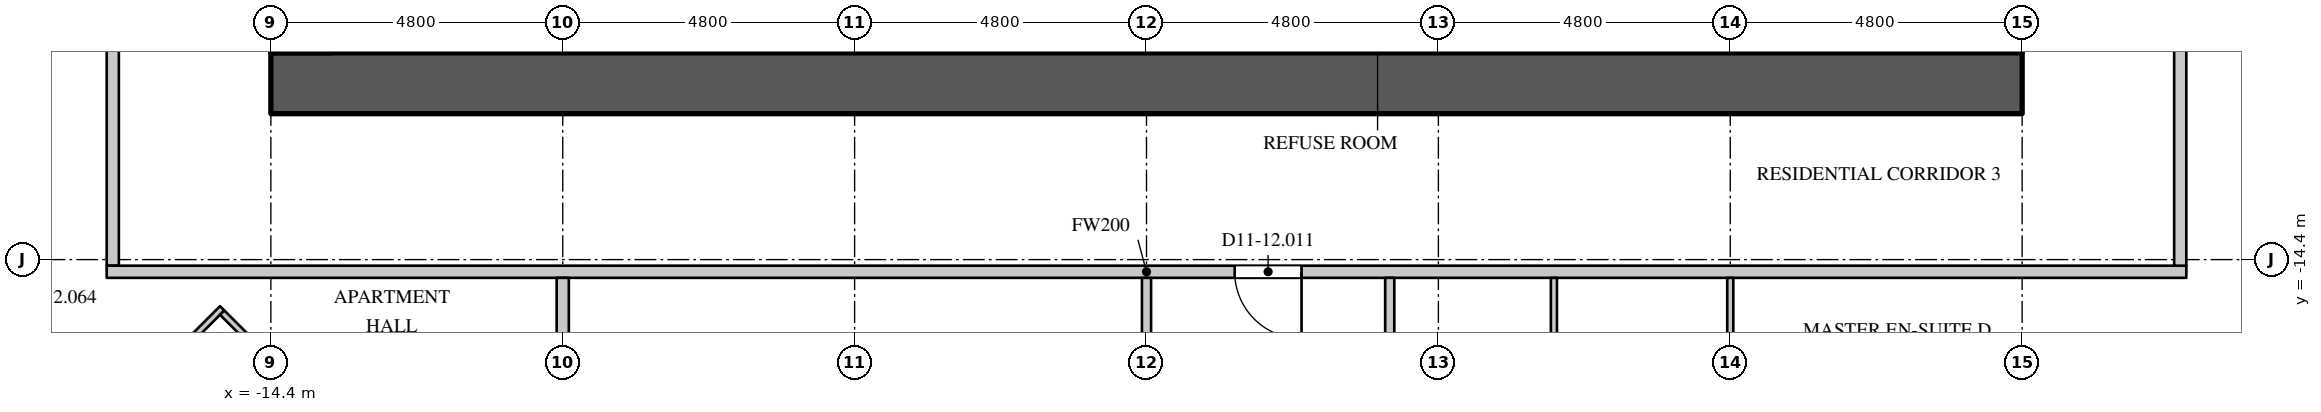
"""IFC4 building model, lengths in metres.
Left out: names, types, materials, properties, quantities, classifications, styles, units other than length and angle.
Written with IfcOpenShell. Run it as: python <this file> out.ifc"""

import sys

from ifc_helpers import new_model, si_unit, direction, frame, frame_2d, origin, place, context, subcontext, project, spatial, rectangle, extrude, element, fill, save


model = new_model("IFC4")
c1 = context("Model", 3, precision=1e-05, world=origin(), true_north=direction((0.0, 1.0)))
c2 = subcontext(c1, "Body", "Model", "MODEL_VIEW")
j1 = project(units=[si_unit("LENGTHUNIT", "METRE"), si_unit("PLANEANGLEUNIT", "RADIAN")], contexts=[c1])
p1 = place(None, origin())
s1 = spatial("IfcSite", under=j1, at=p1, CompositionType="ELEMENT")
p2 = place(p1, origin())
s2 = spatial("IfcBuilding", under=s1, at=p2, CompositionType="ELEMENT")
p3 = place(p2, frame((0.0, 0.0, 50.7)))
s3 = spatial("IfcBuildingStorey", under=s2, at=p3, CompositionType="ELEMENT", Elevation=50.7)
p4 = place(p3, frame((-14.4, -11.5, 0.0), z_axis=(0.0, 0.0, 1.0), x_axis=(1.0, 0.0, 0.0)))
e1 = element("IfcWall", 1, at=p4, inside=s3, PredefinedType="SHEAR", context=c2, shape_type="SweptSolid", body=[
    extrude(rectangle(XDim=28.8, YDim=1.0, at=frame_2d((14.4, 0.0))), origin(), (0.0, 0.0, 1.0), 4.2),
])
p5 = place(p3, frame((-17.0, -14.5, 0.0), z_axis=(0.0, 0.0, 1.0), x_axis=(0.0, 1.0, 0.0)))
e2 = element("IfcWall", 2, at=p5, inside=s3, PredefinedType="PARTITIONING", context=c2, shape_type="SweptSolid", body=[
    extrude(rectangle(XDim=29.0, YDim=0.2, at=frame_2d((14.5, 0.0))), origin(), (0.0, 0.0, 1.0), 3.95),
])
p6 = place(p5, frame((11.55, 0.0, 0.0)))
e3 = element("IfcOpeningElement", 3, at=p6, cuts=e2, PredefinedType="OPENING", context=c2, shape_type="SweptSolid", body=[
    extrude(rectangle(XDim=1.1, YDim=2.4, at=frame_2d((0.55, 1.2))), frame((0.0, 0.11, 0.0), z_axis=(0.0, -1.0, 0.0), x_axis=(1.0, 0.0, 0.0)), (0.0, 0.0, 1.0), 0.22),
])
p7 = place(p3, frame((-17.1, -14.6, 0.0), z_axis=(0.0, 0.0, 1.0), x_axis=(1.0, 0.0, 0.0)))
e4 = element("IfcWall", 4, at=p7, inside=s3, PredefinedType="PARTITIONING", context=c2, shape_type="SweptSolid", body=[
    extrude(rectangle(XDim=34.2, YDim=0.2, at=frame_2d((17.1, 0.0))), origin(), (0.0, 0.0, 1.0), 3.95),
])
p8 = place(p7, frame((18.55, 0.0, 0.0)))
e5 = element("IfcOpeningElement", 5, at=p8, cuts=e4, PredefinedType="OPENING", context=c2, shape_type="SweptSolid", body=[
    extrude(rectangle(XDim=1.1, YDim=2.4, at=frame_2d((0.55, 1.2))), frame((0.0, 0.11, 0.0), z_axis=(0.0, -1.0, 0.0), x_axis=(1.0, 0.0, 0.0)), (0.0, 0.0, 1.0), 0.22),
])
p9 = place(p3, frame((17.0, -14.5, 0.0), z_axis=(0.0, 0.0, 1.0), x_axis=(0.0, 1.0, 0.0)))
e6 = element("IfcWall", 6, at=p9, inside=s3, PredefinedType="PARTITIONING", context=c2, shape_type="SweptSolid", body=[
    extrude(rectangle(XDim=29.0, YDim=0.2, at=frame_2d((14.5, 0.0))), origin(), (0.0, 0.0, 1.0), 3.95),
])
p10 = place(p9, frame((16.4, 0.0, 0.0)))
e7 = element("IfcOpeningElement", 7, at=p10, cuts=e6, PredefinedType="OPENING", context=c2, shape_type="SweptSolid", body=[
    extrude(rectangle(XDim=1.1, YDim=2.4, at=frame_2d((0.55, 1.2))), frame((0.0, 0.11, 0.0), z_axis=(0.0, -1.0, 0.0), x_axis=(1.0, 0.0, 0.0)), (0.0, 0.0, 1.0), 0.22),
])
p11 = place(p3, frame((-20.763, -13.669, 0.0), z_axis=(0.0, 0.0, 1.0), x_axis=(0.707106781187, -0.707106781187, 0.0)))
e8 = element("IfcWall", 8, at=p11, inside=s3, PredefinedType="PARTITIONING", context=c2, shape_type="SweptSolid", body=[
    extrude(rectangle(XDim=4.966, YDim=0.15, at=frame_2d((2.483, 0.0))), origin(), (0.0, 0.0, 1.0), 3.95),
])
p12 = place(p11, frame((1.45, 0.0, 0.0)))
e9 = element("IfcOpeningElement", 9, at=p12, cuts=e8, PredefinedType="OPENING", context=c2, shape_type="SweptSolid", body=[
    extrude(rectangle(XDim=0.95, YDim=2.2, at=frame_2d((0.475, 1.1))), frame((0.0, 0.085, 0.0), z_axis=(0.0, -1.0, 0.0), x_axis=(1.0, 0.0, 0.0)), (0.0, 0.0, 1.0), 0.17),
])
p13 = place(p3, frame((0.0, -28.855, 0.0), z_axis=(0.0, 0.0, 1.0), x_axis=(0.0, 1.0, 0.0)))
e10 = element("IfcWall", 10, at=p13, inside=s3, PredefinedType="PARTITIONING", context=c2, shape_type="SweptSolid", body=[
    extrude(rectangle(XDim=14.155, YDim=0.15, at=frame_2d((7.078, 0.0))), origin(), (0.0, 0.0, 1.0), 3.95),
])
p14 = place(p13, frame((10.2, 0.0, 0.0)))
e11 = element("IfcOpeningElement", 11, at=p14, cuts=e10, PredefinedType="OPENING", context=c2, shape_type="SweptSolid", body=[
    extrude(rectangle(XDim=0.95, YDim=2.2, at=frame_2d((0.475, 1.1))), frame((0.0, 0.085, 0.0), z_axis=(0.0, -1.0, 0.0), x_axis=(1.0, 0.0, 0.0)), (0.0, 0.0, 1.0), 0.17),
])
p15 = place(p3, frame((4.0, -21.725, 0.0), z_axis=(0.0, 0.0, 1.0), x_axis=(0.0, 1.0, 0.0)))
e12 = element("IfcWall", 12, at=p15, inside=s3, PredefinedType="PARTITIONING", context=c2, shape_type="SweptSolid", body=[
    extrude(rectangle(XDim=7.025, YDim=0.15, at=frame_2d((3.513, 0.0))), origin(), (0.0, 0.0, 1.0), 3.95),
])
p16 = place(p15, frame((3.05, 0.0, 0.0)))
e13 = element("IfcOpeningElement", 13, at=p16, cuts=e12, PredefinedType="OPENING", context=c2, shape_type="SweptSolid", body=[
    extrude(rectangle(XDim=0.95, YDim=2.2, at=frame_2d((0.475, 1.1))), frame((0.0, 0.085, 0.0), z_axis=(0.0, -1.0, 0.0), x_axis=(1.0, 0.0, 0.0)), (0.0, 0.0, 1.0), 0.17),
])
p17 = place(p3, frame((17.552, -17.446, 0.0), z_axis=(0.0, 0.0, 1.0), x_axis=(0.707106781187, 0.707106781187, 0.0)))
e14 = element("IfcWall", 14, at=p17, inside=s3, PredefinedType="PARTITIONING", context=c2, shape_type="SweptSolid", body=[
    extrude(rectangle(XDim=7.78, YDim=0.15, at=frame_2d((3.89, 0.0))), origin(), (0.0, 0.0, 1.0), 3.95),
])
p18 = place(p17, frame((1.95, 0.0, 0.0)))
e15 = element("IfcOpeningElement", 15, at=p18, cuts=e14, PredefinedType="OPENING", context=c2, shape_type="SweptSolid", body=[
    extrude(rectangle(XDim=0.95, YDim=2.2, at=frame_2d((0.475, 1.1))), frame((0.0, 0.085, 0.0), z_axis=(0.0, -1.0, 0.0), x_axis=(1.0, 0.0, 0.0)), (0.0, 0.0, 1.0), 0.17),
])
p19 = place(p17, frame((6.65, 0.0, 0.0)))
e16 = element("IfcOpeningElement", 16, at=p19, cuts=e14, PredefinedType="OPENING", context=c2, shape_type="SweptSolid", body=[
    extrude(rectangle(XDim=0.95, YDim=2.2, at=frame_2d((0.475, 1.1))), frame((0.0, 0.085, 0.0), z_axis=(0.0, -1.0, 0.0), x_axis=(1.0, 0.0, 0.0)), (0.0, 0.0, 1.0), 0.17),
])
p20 = place(p3, frame((-9.6, -28.855, 0.0), z_axis=(0.0, 0.0, 1.0), x_axis=(0.0, 1.0, 0.0)))
e17 = element("IfcWall", 17, at=p20, inside=s3, PredefinedType="PARTITIONING", context=c2, shape_type="SweptSolid", body=[
    extrude(rectangle(XDim=14.155, YDim=0.2, at=frame_2d((7.078, 0.0))), origin(), (0.0, 0.0, 1.0), 3.95),
])
p21 = place(p3, frame((-17.626, -17.626, 0.0), z_axis=(0.0, 0.0, 1.0), x_axis=(0.707106781187, 0.707106781187, 0.0)))
e18 = element("IfcWall", 18, at=p21, inside=s3, PredefinedType="PARTITIONING", context=c2, shape_type="SweptSolid", body=[
    extrude(rectangle(XDim=3.43, YDim=0.1, at=frame_2d((1.715, 0.0))), origin(), (0.0, 0.0, 1.0), 3.95),
])
p22 = place(p3, frame((-15.201, -15.271, 0.0), z_axis=(0.0, 0.0, 1.0), x_axis=(0.707106781187, -0.707106781187, 0.0)))
e19 = element("IfcWall", 19, at=p22, inside=s3, PredefinedType="PARTITIONING", context=c2, shape_type="SweptSolid", body=[
    extrude(rectangle(XDim=2.7, YDim=0.1, at=frame_2d((1.35, 0.0))), origin(), (0.0, 0.0, 1.0), 3.95),
])
p23 = place(p3, frame((6.7, -21.725, 0.0), z_axis=(0.0, 0.0, 1.0), x_axis=(0.0, 1.0, 0.0)))
e20 = element("IfcWall", 20, at=p23, inside=s3, PredefinedType="PARTITIONING", context=c2, shape_type="SweptSolid", body=[
    extrude(rectangle(XDim=7.025, YDim=0.1, at=frame_2d((3.513, 0.0))), origin(), (0.0, 0.0, 1.0), 3.95),
])
p24 = place(p3, frame((9.6, -21.82, 0.0), z_axis=(0.0, 0.0, 1.0), x_axis=(0.0, 1.0, 0.0)))
e21 = element("IfcWall", 21, at=p24, inside=s3, PredefinedType="PARTITIONING", context=c2, shape_type="SweptSolid", body=[
    extrude(rectangle(XDim=7.12, YDim=0.1, at=frame_2d((3.56, 0.0))), origin(), (0.0, 0.0, 1.0), 3.95),
])
p25 = place(p24, frame((3.15, 0.0, 0.0)))
e22 = element("IfcOpeningElement", 22, at=p25, cuts=e21, PredefinedType="OPENING", context=c2, shape_type="SweptSolid", body=[
    extrude(rectangle(XDim=0.9, YDim=2.2, at=frame_2d((0.45, 1.1))), frame((0.0, 0.06, 0.0), z_axis=(0.0, -1.0, 0.0), x_axis=(1.0, 0.0, 0.0)), (0.0, 0.0, 1.0), 0.12),
])
p26 = place(p8, origin())
e23 = element("IfcDoor", 23, at=p26, inside=s3, OperationType="SINGLE_SWING_LEFT", PredefinedType="DOOR", context=c2, shape_type="SweptSolid", body=[
    extrude(rectangle(XDim=1.1, YDim=2.4, at=frame_2d((0.55, 1.2))), frame((0.0, 0.025, 0.0), z_axis=(0.0, -1.0, 0.0), x_axis=(1.0, 0.0, 0.0)), (0.0, 0.0, 1.0), 0.05),
])
fill(e5, e23)
save(model, sys.argv[1])
